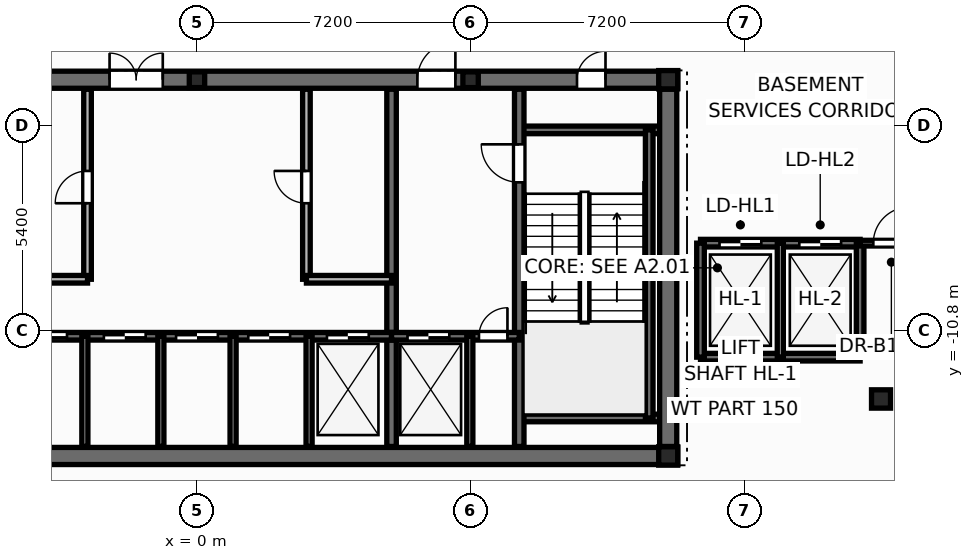
"""IFC4 building model, lengths in metres.
Left out: names, types, materials, properties, quantities, classifications, styles, units other than length and angle.
Written with IfcOpenShell. Run it as: python <this file> out.ifc"""

import sys

from ifc_helpers import new_model, si_unit, direction, frame, frame_2d, origin, origin_2d, place, context, subcontext, project, spatial, rectangle, i_section, extrude, element, fill, save


model = new_model("IFC4")
c1 = context("Model", 3, precision=1e-05, world=origin(), true_north=direction((0.0, 1.0)))
c2 = subcontext(c1, "Body", "Model", "MODEL_VIEW")
j1 = project(units=[si_unit("LENGTHUNIT", "METRE"), si_unit("PLANEANGLEUNIT", "RADIAN")], contexts=[c1])
p1 = place(None, origin())
s1 = spatial("IfcSite", under=j1, at=p1, CompositionType="ELEMENT")
p2 = place(p1, origin())
s2 = spatial("IfcBuilding", under=s1, at=p2, CompositionType="ELEMENT")
p3 = place(p2, frame((0.0, 0.0, -4.8)))
s3 = spatial("IfcBuildingStorey", under=s2, at=p3, CompositionType="ELEMENT", Elevation=-4.8)
for number, where, z_axis, x_axis in (
    (1, (12.4, -14.1, 0.0), (0.0, 0.0, 1.0), (1.0, 0.0, 0.0)),
    (2, (12.4, -4.2, 0.0), (0.0, 0.0, 1.0), (1.0, 0.0, 0.0)),
):
    element("IfcColumn", number, at=place(p3, frame(where, z_axis=z_axis, x_axis=x_axis)), inside=s3, PredefinedType="COLUMN", context=c2, shape_type="SweptSolid", body=[
        extrude(i_section(OverallWidth=0.5, OverallDepth=0.482, WebThickness=0.04, FlangeThickness=0.045, at=origin_2d()), origin(), (0.0, 0.0, 1.0), 4.8),
    ])
for number, where, z_axis, x_axis in (
    (3, (0.0, -4.2, 0.0), (0.0, 0.0, 1.0), (1.0, 0.0, 0.0)),
    (4, (7.2, -4.2, 0.0), (0.0, 0.0, 1.0), (1.0, 0.0, 0.0)),
):
    element("IfcColumn", number, at=place(p3, frame(where, z_axis=z_axis, x_axis=x_axis)), inside=s3, PredefinedType="PILASTER", context=c2, shape_type="SweptSolid", body=[
        extrude(i_section(OverallWidth=0.405, OverallDepth=0.414, WebThickness=0.022, FlangeThickness=0.032, at=origin_2d()), origin(), (0.0, 0.0, 1.0), 4.8),
    ])
p4 = place(p3, frame((18.0, -12.6, 0.0), z_axis=(0.0, 0.0, 1.0), x_axis=(1.0, 0.0, 0.0)))
e5 = element("IfcColumn", 5, at=p4, inside=s3, PredefinedType="COLUMN", context=c2, shape_type="SweptSolid", body=[
    extrude(i_section(OverallWidth=0.5, OverallDepth=0.482, WebThickness=0.04, FlangeThickness=0.045, at=origin_2d()), origin(), (0.0, 0.0, 1.0), 4.8),
])
p5 = place(p3, frame((-12.65, -14.1, 0.0), z_axis=(0.0, 0.0, 1.0), x_axis=(1.0, 0.0, 0.0)))
e6 = element("IfcWall", 6, at=p5, inside=s3, PredefinedType="SHEAR", context=c2, shape_type="SweptSolid", body=[
    extrude(rectangle(XDim=25.3, YDim=0.45, at=frame_2d((12.65, 0.0))), origin(), (0.0, 0.0, 1.0), 4.8),
])
p6 = place(p3, frame((-12.65, -4.2, 0.0), z_axis=(0.0, 0.0, 1.0), x_axis=(1.0, 0.0, 0.0)))
e7 = element("IfcWall", 7, at=p6, inside=s3, PredefinedType="SHEAR", context=c2, shape_type="SweptSolid", body=[
    extrude(rectangle(XDim=25.3, YDim=0.45, at=frame_2d((12.65, 0.0))), origin(), (0.0, 0.0, 1.0), 4.8),
])
p7 = place(p6, frame((1.85, 0.0, 0.0)))
e8 = element("IfcOpeningElement", 8, at=p7, cuts=e7, PredefinedType="OPENING", context=c2, shape_type="SweptSolid", body=[
    extrude(rectangle(XDim=0.756, YDim=2.054, at=frame_2d((0.375, 1.027))), frame((0.0, 0.235, 0.0), z_axis=(0.0, -1.0, 0.0), x_axis=(1.0, 0.0, 0.0)), (0.0, 0.0, 1.0), 0.47),
])
p8 = place(p6, frame((22.65, 0.0, 0.0)))
e9 = element("IfcOpeningElement", 9, at=p8, cuts=e7, PredefinedType="OPENING", context=c2, shape_type="SweptSolid", body=[
    extrude(rectangle(XDim=0.756, YDim=2.054, at=frame_2d((0.375, 1.027))), frame((0.0, 0.235, 0.0), z_axis=(0.0, -1.0, 0.0), x_axis=(1.0, 0.0, 0.0)), (0.0, 0.0, 1.0), 0.47),
])
p9 = place(p6, frame((5.85, 0.0, 0.0)))
e10 = element("IfcOpeningElement", 10, at=p9, cuts=e7, PredefinedType="OPENING", context=c2, shape_type="SweptSolid", body=[
    extrude(rectangle(XDim=1.006, YDim=2.104, at=frame_2d((0.5, 1.052))), frame((0.0, 0.235, 0.0), z_axis=(0.0, -1.0, 0.0), x_axis=(1.0, 0.0, 0.0)), (0.0, 0.0, 1.0), 0.47),
])
p10 = place(p6, frame((10.35, 0.0, 0.0)))
e11 = element("IfcOpeningElement", 11, at=p10, cuts=e7, PredefinedType="OPENING", context=c2, shape_type="SweptSolid", body=[
    extrude(rectangle(XDim=1.406, YDim=2.154, at=frame_2d((0.7, 1.077))), frame((0.0, 0.235, 0.0), z_axis=(0.0, -1.0, 0.0), x_axis=(1.0, 0.0, 0.0)), (0.0, 0.0, 1.0), 0.47),
])
p11 = place(p6, frame((18.45, 0.0, 0.0)))
e12 = element("IfcOpeningElement", 12, at=p11, cuts=e7, PredefinedType="OPENING", context=c2, shape_type="SweptSolid", body=[
    extrude(rectangle(XDim=1.006, YDim=2.104, at=frame_2d((0.5, 1.052))), frame((0.0, 0.235, 0.0), z_axis=(0.0, -1.0, 0.0), x_axis=(1.0, 0.0, 0.0)), (0.0, 0.0, 1.0), 0.47),
])
for number, where, z_axis, x_axis in (
    (13, (8.48, -5.52, 0.0), (0.0, 0.0, 1.0), (1.0, 0.0, 0.0)),
    (14, (8.48, -13.1, 0.0), (0.0, 0.0, 1.0), (1.0, 0.0, 0.0)),
):
    element("IfcWall", number, at=place(p3, frame(where, z_axis=z_axis, x_axis=x_axis)), inside=s3, PredefinedType="SOLIDWALL", context=c2, shape_type="SweptSolid", body=[
        extrude(rectangle(XDim=3.87, YDim=0.2, at=frame_2d((1.935, 0.0))), origin(), (0.0, 0.0, 1.0), 4.8),
    ])
p12 = place(p3, frame((11.9, -13.1, 0.0), z_axis=(0.0, 0.0, 1.0), x_axis=(0.0, 1.0, 0.0)))
e15 = element("IfcWall", 15, at=p12, inside=s3, PredefinedType="SOLIDWALL", context=c2, shape_type="SweptSolid", body=[
    extrude(rectangle(XDim=7.58, YDim=0.2, at=frame_2d((3.79, 0.0))), origin(), (0.0, 0.0, 1.0), 4.8),
])
p13 = place(p3, frame((8.48, -13.85, 0.0), z_axis=(0.0, 0.0, 1.0), x_axis=(0.0, 1.0, 0.0)))
e16 = element("IfcWall", 16, at=p13, inside=s3, PredefinedType="SHEAR", context=c2, shape_type="SweptSolid", body=[
    extrude(rectangle(XDim=9.4, YDim=0.25, at=frame_2d((4.7, 0.0))), origin(), (0.0, 0.0, 1.0), 4.8),
])
p14 = place(p13, frame((6.95, 0.0, 0.0)))
e17 = element("IfcOpeningElement", 17, at=p14, cuts=e16, PredefinedType="OPENING", context=c2, shape_type="SweptSolid", body=[
    extrude(rectangle(XDim=1.006, YDim=2.104, at=frame_2d((0.5, 1.052))), frame((0.0, 0.135, 0.0), z_axis=(0.0, -1.0, 0.0), x_axis=(1.0, 0.0, 0.0)), (0.0, 0.0, 1.0), 0.27),
])
p15 = place(p3, frame((5.12, -13.85, 0.0), z_axis=(0.0, 0.0, 1.0), x_axis=(0.0, 1.0, 0.0)))
e18 = element("IfcWall", 18, at=p15, inside=s3, PredefinedType="SHEAR", context=c2, shape_type="SweptSolid", body=[
    extrude(rectangle(XDim=9.4, YDim=0.25, at=frame_2d((4.7, 0.0))), origin(), (0.0, 0.0, 1.0), 4.8),
])
p16 = place(p3, frame((-5.12, -10.95, 0.0), z_axis=(0.0, 0.0, 1.0), x_axis=(1.0, 0.0, 0.0)))
e19 = element("IfcWall", 19, at=p16, inside=s3, PredefinedType="SOLIDWALL", context=c2, shape_type="SweptSolid", body=[
    extrude(rectangle(XDim=10.24, YDim=0.2, at=frame_2d((5.12, 0.0))), origin(), (0.0, 0.0, 1.0), 4.8),
])
p17 = place(p16, frame((0.6, 0.0, 0.0)))
e20 = element("IfcOpeningElement", 20, at=p17, cuts=e19, PredefinedType="OPENING", context=c2, shape_type="SweptSolid", body=[
    extrude(rectangle(XDim=1.106, YDim=2.104, at=frame_2d((0.55, 1.052))), frame((0.0, 0.11, 0.0), z_axis=(0.0, -1.0, 0.0), x_axis=(1.0, 0.0, 0.0)), (0.0, 0.0, 1.0), 0.22),
])
p18 = place(p16, frame((2.67, 0.0, 0.0)))
e21 = element("IfcOpeningElement", 21, at=p18, cuts=e19, PredefinedType="OPENING", context=c2, shape_type="SweptSolid", body=[
    extrude(rectangle(XDim=1.106, YDim=2.104, at=frame_2d((0.55, 1.052))), frame((0.0, 0.11, 0.0), z_axis=(0.0, -1.0, 0.0), x_axis=(1.0, 0.0, 0.0)), (0.0, 0.0, 1.0), 0.22),
])
p19 = place(p16, frame((4.57, 0.0, 0.0)))
e22 = element("IfcOpeningElement", 22, at=p19, cuts=e19, PredefinedType="OPENING", context=c2, shape_type="SweptSolid", body=[
    extrude(rectangle(XDim=1.106, YDim=2.104, at=frame_2d((0.55, 1.052))), frame((0.0, 0.11, 0.0), z_axis=(0.0, -1.0, 0.0), x_axis=(1.0, 0.0, 0.0)), (0.0, 0.0, 1.0), 0.22),
])
p20 = place(p16, frame((6.47, 0.0, 0.0)))
e23 = element("IfcOpeningElement", 23, at=p20, cuts=e19, PredefinedType="OPENING", context=c2, shape_type="SweptSolid", body=[
    extrude(rectangle(XDim=1.106, YDim=2.104, at=frame_2d((0.55, 1.052))), frame((0.0, 0.11, 0.0), z_axis=(0.0, -1.0, 0.0), x_axis=(1.0, 0.0, 0.0)), (0.0, 0.0, 1.0), 0.22),
])
p21 = place(p16, frame((8.54, 0.0, 0.0)))
e24 = element("IfcOpeningElement", 24, at=p21, cuts=e19, PredefinedType="OPENING", context=c2, shape_type="SweptSolid", body=[
    extrude(rectangle(XDim=1.106, YDim=2.104, at=frame_2d((0.55, 1.052))), frame((0.0, 0.11, 0.0), z_axis=(0.0, -1.0, 0.0), x_axis=(1.0, 0.0, 0.0)), (0.0, 0.0, 1.0), 0.22),
])
p22 = place(p3, frame((5.12, -10.95, 0.0), z_axis=(0.0, 0.0, 1.0), x_axis=(1.0, 0.0, 0.0)))
e25 = element("IfcWall", 25, at=p22, inside=s3, PredefinedType="SOLIDWALL", context=c2, shape_type="SweptSolid", body=[
    extrude(rectangle(XDim=3.36, YDim=0.2, at=frame_2d((1.68, 0.0))), origin(), (0.0, 0.0, 1.0), 4.8),
])
p23 = place(p22, frame((0.42, 0.0, 0.0)))
e26 = element("IfcOpeningElement", 26, at=p23, cuts=e25, PredefinedType="OPENING", context=c2, shape_type="SweptSolid", body=[
    extrude(rectangle(XDim=1.106, YDim=2.104, at=frame_2d((0.55, 1.052))), frame((0.0, 0.11, 0.0), z_axis=(0.0, -1.0, 0.0), x_axis=(1.0, 0.0, 0.0)), (0.0, 0.0, 1.0), 0.22),
])
p24 = place(p22, frame((2.3, 0.0, 0.0)))
e27 = element("IfcOpeningElement", 27, at=p24, cuts=e25, PredefinedType="OPENING", context=c2, shape_type="SweptSolid", body=[
    extrude(rectangle(XDim=0.756, YDim=2.054, at=frame_2d((0.375, 1.027))), frame((0.0, 0.11, 0.0), z_axis=(0.0, -1.0, 0.0), x_axis=(1.0, 0.0, 0.0)), (0.0, 0.0, 1.0), 0.22),
])
for number, where, z_axis, x_axis in (
    (28, (7.18, -13.85, 0.0), (0.0, 0.0, 1.0), (0.0, 1.0, 0.0)),
    (29, (-2.95, -13.85, 0.0), (0.0, 0.0, 1.0), (0.0, 1.0, 0.0)),
    (30, (2.95, -13.85, 0.0), (0.0, 0.0, 1.0), (0.0, 1.0, 0.0)),
):
    element("IfcWall", number, at=place(p3, frame(where, z_axis=z_axis, x_axis=x_axis)), inside=s3, PredefinedType="PARTITIONING", context=c2, shape_type="SweptSolid", body=[
        extrude(rectangle(XDim=2.9, YDim=0.16, at=frame_2d((1.45, 0.0))), origin(), (0.0, 0.0, 1.0), 3.505),
    ])
p25 = place(p3, frame((12.4, -13.85, 0.0), z_axis=(0.0, 0.0, 1.0), x_axis=(0.0, 1.0, 0.0)))
e31 = element("IfcWall", 31, at=p25, inside=s3, PredefinedType="SHEAR", context=c2, shape_type="SweptSolid", body=[
    extrude(rectangle(XDim=9.4, YDim=0.45, at=frame_2d((4.7, 0.0))), origin(), (0.0, 0.0, 1.0), 4.8),
])
p26 = place(p3, frame((-2.88, -9.45, 0.0), z_axis=(0.0, 0.0, 1.0), x_axis=(0.0, 1.0, 0.0)))
e32 = element("IfcWall", 32, at=p26, inside=s3, PredefinedType="SOLIDWALL", context=c2, shape_type="SweptSolid", body=[
    extrude(rectangle(XDim=5.0, YDim=0.2, at=frame_2d((2.5, 0.0))), origin(), (0.0, 0.0, 1.0), 4.48),
])
p27 = place(p26, frame((2.0, 0.0, 0.0)))
e33 = element("IfcOpeningElement", 33, at=p27, cuts=e32, PredefinedType="OPENING", context=c2, shape_type="SweptSolid", body=[
    extrude(rectangle(XDim=0.856, YDim=2.054, at=frame_2d((0.425, 1.027))), frame((0.0, 0.11, 0.0), z_axis=(0.0, -1.0, 0.0), x_axis=(1.0, 0.0, 0.0)), (0.0, 0.0, 1.0), 0.22),
])
p28 = place(p3, frame((-5.12, -9.45, 0.0), z_axis=(0.0, 0.0, 1.0), x_axis=(1.0, 0.0, 0.0)))
e34 = element("IfcWall", 34, at=p28, inside=s3, PredefinedType="SOLIDWALL", context=c2, shape_type="SweptSolid", body=[
    extrude(rectangle(XDim=2.24, YDim=0.2, at=frame_2d((1.12, 0.0))), origin(), (0.0, 0.0, 1.0), 4.48),
])
p29 = place(p3, frame((2.88, -9.45, 0.0), z_axis=(0.0, 0.0, 1.0), x_axis=(0.0, 1.0, 0.0)))
e35 = element("IfcWall", 35, at=p29, inside=s3, PredefinedType="SOLIDWALL", context=c2, shape_type="SweptSolid", body=[
    extrude(rectangle(XDim=5.0, YDim=0.2, at=frame_2d((2.5, 0.0))), origin(), (0.0, 0.0, 1.0), 4.48),
])
p30 = place(p29, frame((2.0, 0.0, 0.0)))
e36 = element("IfcOpeningElement", 36, at=p30, cuts=e35, PredefinedType="OPENING", context=c2, shape_type="SweptSolid", body=[
    extrude(rectangle(XDim=0.856, YDim=2.054, at=frame_2d((0.425, 1.027))), frame((0.0, 0.11, 0.0), z_axis=(0.0, -1.0, 0.0), x_axis=(1.0, 0.0, 0.0)), (0.0, 0.0, 1.0), 0.22),
])
p31 = place(p3, frame((2.88, -9.45, 0.0), z_axis=(0.0, 0.0, 1.0), x_axis=(1.0, 0.0, 0.0)))
e37 = element("IfcWall", 37, at=p31, inside=s3, PredefinedType="SOLIDWALL", context=c2, shape_type="SweptSolid", body=[
    extrude(rectangle(XDim=2.24, YDim=0.2, at=frame_2d((1.12, 0.0))), origin(), (0.0, 0.0, 1.0), 4.48),
])
for number, where, z_axis, x_axis in (
    (38, (-0.95, -13.85, 0.0), (0.0, 0.0, 1.0), (0.0, 1.0, 0.0)),
    (39, (0.95, -13.85, 0.0), (0.0, 0.0, 1.0), (0.0, 1.0, 0.0)),
):
    element("IfcWall", number, at=place(p3, frame(where, z_axis=z_axis, x_axis=x_axis)), inside=s3, PredefinedType="PARTITIONING", context=c2, shape_type="SweptSolid", body=[
        extrude(rectangle(XDim=2.9, YDim=0.16, at=frame_2d((1.45, 0.0))), origin(), (0.0, 0.0, 1.0), 3.505),
    ])
p32 = place(p3, frame((13.25, -11.5, 0.0), z_axis=(0.0, 0.0, 1.0), x_axis=(1.0, 0.0, 0.0)))
e40 = element("IfcWall", 40, at=p32, inside=s3, PredefinedType="SOLIDWALL", context=c2, shape_type="SweptSolid", body=[
    extrude(rectangle(XDim=4.2, YDim=0.2, at=frame_2d((2.1, 0.0))), origin(), (0.0, 0.0, 1.0), 4.8),
])
p33 = place(p3, frame((13.25, -8.5, 0.0), z_axis=(0.0, 0.0, 1.0), x_axis=(1.0, 0.0, 0.0)))
e41 = element("IfcWall", 41, at=p33, inside=s3, PredefinedType="SOLIDWALL", context=c2, shape_type="SweptSolid", body=[
    extrude(rectangle(XDim=4.2, YDim=0.2, at=frame_2d((2.1, 0.0))), origin(), (0.0, 0.0, 1.0), 4.8),
])
p34 = place(p33, frame((0.5, 0.0, 0.0)))
e42 = element("IfcOpeningElement", 42, at=p34, cuts=e41, PredefinedType="OPENING", context=c2, shape_type="SweptSolid", body=[
    extrude(rectangle(XDim=1.106, YDim=2.104, at=frame_2d((0.55, 1.052))), frame((0.0, 0.11, 0.0), z_axis=(0.0, -1.0, 0.0), x_axis=(1.0, 0.0, 0.0)), (0.0, 0.0, 1.0), 0.22),
])
p35 = place(p33, frame((2.6, 0.0, 0.0)))
e43 = element("IfcOpeningElement", 43, at=p35, cuts=e41, PredefinedType="OPENING", context=c2, shape_type="SweptSolid", body=[
    extrude(rectangle(XDim=1.106, YDim=2.104, at=frame_2d((0.55, 1.052))), frame((0.0, 0.11, 0.0), z_axis=(0.0, -1.0, 0.0), x_axis=(1.0, 0.0, 0.0)), (0.0, 0.0, 1.0), 0.22),
])
for number, where, z_axis, x_axis in (
    (44, (13.25, -11.5, 0.0), (0.0, 0.0, 1.0), (0.0, 1.0, 0.0)),
    (45, (17.45, -11.5, 0.0), (0.0, 0.0, 1.0), (0.0, 1.0, 0.0)),
):
    element("IfcWall", number, at=place(p3, frame(where, z_axis=z_axis, x_axis=x_axis)), inside=s3, PredefinedType="SOLIDWALL", context=c2, shape_type="SweptSolid", body=[
        extrude(rectangle(XDim=3.0, YDim=0.2, at=frame_2d((1.5, 0.0))), origin(), (0.0, 0.0, 1.0), 4.8),
    ])
p36 = place(p3, frame((15.35, -11.5, 0.0), z_axis=(0.0, 0.0, 1.0), x_axis=(0.0, 1.0, 0.0)))
e46 = element("IfcWall", 46, at=p36, inside=s3, PredefinedType="PARTITIONING", context=c2, shape_type="SweptSolid", body=[
    extrude(rectangle(XDim=3.0, YDim=0.16, at=frame_2d((1.5, 0.0))), origin(), (0.0, 0.0, 1.0), 4.48),
])
p37 = place(p3, frame((17.452, -8.5, 0.0), z_axis=(0.0, 0.0, 1.0), x_axis=(1.0, 0.0, 0.0)))
e47 = element("IfcWall", 47, at=p37, inside=s3, PredefinedType="PARTITIONING", context=c2, shape_type="SweptSolid", body=[
    extrude(rectangle(XDim=1.986, YDim=0.15, at=frame_2d((0.993, 0.0))), origin(), (0.0, 0.0, 1.0), 4.48),
])
p38 = place(p37, frame((0.345, 0.0, 0.0)))
e48 = element("IfcOpeningElement", 48, at=p38, cuts=e47, PredefinedType="OPENING", context=c2, shape_type="SweptSolid", body=[
    extrude(rectangle(XDim=0.956, YDim=2.104, at=frame_2d((0.475, 1.052))), frame((0.0, 0.085, 0.0), z_axis=(0.0, -1.0, 0.0), x_axis=(1.0, 0.0, 0.0)), (0.0, 0.0, 1.0), 0.17),
])
p39 = place(p27, origin())
e49 = element("IfcDoor", 49, at=p39, inside=s3, OperationType="SINGLE_SWING_LEFT", PredefinedType="DOOR", context=c2, shape_type="SweptSolid", body=[
    extrude(rectangle(XDim=0.85, YDim=2.05, at=frame_2d((0.425, 1.025))), frame((0.0, 0.025, 0.0), z_axis=(0.0, -1.0, 0.0), x_axis=(1.0, 0.0, 0.0)), (0.0, 0.0, 1.0), 0.05),
])
fill(e33, e49)
p40 = place(p30, origin())
e50 = element("IfcDoor", 50, at=p40, inside=s3, OperationType="SINGLE_SWING_RIGHT", PredefinedType="DOOR", context=c2, shape_type="SweptSolid", body=[
    extrude(rectangle(XDim=0.85, YDim=2.05, at=frame_2d((0.425, 1.025))), frame((0.0, 0.025, 0.0), z_axis=(0.0, -1.0, 0.0), x_axis=(1.0, 0.0, 0.0)), (0.0, 0.0, 1.0), 0.05),
])
fill(e36, e50)
p41 = place(p14, origin())
e51 = element("IfcDoor", 51, at=p41, inside=s3, OperationType="SINGLE_SWING_RIGHT", PredefinedType="DOOR", context=c2, shape_type="SweptSolid", body=[
    extrude(rectangle(XDim=1.0, YDim=2.1, at=frame_2d((0.5, 1.05))), frame((0.0, 0.025, 0.0), z_axis=(0.0, -1.0, 0.0), x_axis=(1.0, 0.0, 0.0)), (0.0, 0.0, 1.0), 0.05),
])
fill(e17, e51)
p42 = place(p23, origin())
e52 = element("IfcDoor", 52, at=p42, inside=s3, OperationType="DOUBLE_DOOR_SLIDING", PredefinedType="DOOR", context=c2, shape_type="SweptSolid", body=[
    extrude(rectangle(XDim=1.1, YDim=2.1, at=frame_2d((0.55, 1.05))), frame((0.0, 0.025, 0.0), z_axis=(0.0, -1.0, 0.0), x_axis=(1.0, 0.0, 0.0)), (0.0, 0.0, 1.0), 0.05),
])
fill(e26, e52)
p43 = place(p24, origin())
e53 = element("IfcDoor", 53, at=p43, inside=s3, OperationType="SINGLE_SWING_RIGHT", PredefinedType="DOOR", context=c2, shape_type="SweptSolid", body=[
    extrude(rectangle(XDim=0.75, YDim=2.05, at=frame_2d((0.375, 1.025))), frame((0.0, 0.025, 0.0), z_axis=(0.0, -1.0, 0.0), x_axis=(1.0, 0.0, 0.0)), (0.0, 0.0, 1.0), 0.05),
])
fill(e27, e53)
p44 = place(p17, origin())
e54 = element("IfcDoor", 54, at=p44, inside=s3, OperationType="DOUBLE_DOOR_SLIDING", PredefinedType="DOOR", context=c2, shape_type="SweptSolid", body=[
    extrude(rectangle(XDim=1.1, YDim=2.1, at=frame_2d((0.55, 1.05))), frame((0.0, 0.025, 0.0), z_axis=(0.0, -1.0, 0.0), x_axis=(1.0, 0.0, 0.0)), (0.0, 0.0, 1.0), 0.05),
])
fill(e20, e54)
p45 = place(p18, origin())
e55 = element("IfcDoor", 55, at=p45, inside=s3, OperationType="DOUBLE_DOOR_SLIDING", PredefinedType="DOOR", context=c2, shape_type="SweptSolid", body=[
    extrude(rectangle(XDim=1.1, YDim=2.1, at=frame_2d((0.55, 1.05))), frame((0.0, 0.025, 0.0), z_axis=(0.0, -1.0, 0.0), x_axis=(1.0, 0.0, 0.0)), (0.0, 0.0, 1.0), 0.05),
])
fill(e21, e55)
p46 = place(p19, origin())
e56 = element("IfcDoor", 56, at=p46, inside=s3, OperationType="DOUBLE_DOOR_SLIDING", PredefinedType="DOOR", context=c2, shape_type="SweptSolid", body=[
    extrude(rectangle(XDim=1.1, YDim=2.1, at=frame_2d((0.55, 1.05))), frame((0.0, 0.025, 0.0), z_axis=(0.0, -1.0, 0.0), x_axis=(1.0, 0.0, 0.0)), (0.0, 0.0, 1.0), 0.05),
])
fill(e22, e56)
p47 = place(p20, origin())
e57 = element("IfcDoor", 57, at=p47, inside=s3, OperationType="DOUBLE_DOOR_SLIDING", PredefinedType="DOOR", context=c2, shape_type="SweptSolid", body=[
    extrude(rectangle(XDim=1.1, YDim=2.1, at=frame_2d((0.55, 1.05))), frame((0.0, 0.025, 0.0), z_axis=(0.0, -1.0, 0.0), x_axis=(1.0, 0.0, 0.0)), (0.0, 0.0, 1.0), 0.05),
])
fill(e23, e57)
p48 = place(p21, origin())
e58 = element("IfcDoor", 58, at=p48, inside=s3, OperationType="DOUBLE_DOOR_SLIDING", PredefinedType="DOOR", context=c2, shape_type="SweptSolid", body=[
    extrude(rectangle(XDim=1.1, YDim=2.1, at=frame_2d((0.55, 1.05))), frame((0.0, 0.025, 0.0), z_axis=(0.0, -1.0, 0.0), x_axis=(1.0, 0.0, 0.0)), (0.0, 0.0, 1.0), 0.05),
])
fill(e24, e58)
p49 = place(p8, origin())
e59 = element("IfcDoor", 59, at=p49, inside=s3, OperationType="SINGLE_SWING_RIGHT", PredefinedType="DOOR", context=c2, shape_type="SweptSolid", body=[
    extrude(rectangle(XDim=0.75, YDim=2.05, at=frame_2d((0.375, 1.025))), frame((0.0, 0.025, 0.0), z_axis=(0.0, -1.0, 0.0), x_axis=(1.0, 0.0, 0.0)), (0.0, 0.0, 1.0), 0.05),
])
fill(e9, e59)
p50 = place(p10, origin())
e60 = element("IfcDoor", 60, at=p50, inside=s3, OperationType="DOUBLE_DOOR_SINGLE_SWING", PredefinedType="DOOR", context=c2, shape_type="SweptSolid", body=[
    extrude(rectangle(XDim=1.4, YDim=2.15, at=frame_2d((0.7, 1.075))), frame((0.0, 0.025, 0.0), z_axis=(0.0, -1.0, 0.0), x_axis=(1.0, 0.0, 0.0)), (0.0, 0.0, 1.0), 0.05),
])
fill(e11, e60)
p51 = place(p11, origin())
e61 = element("IfcDoor", 61, at=p51, inside=s3, OperationType="SINGLE_SWING_RIGHT", PredefinedType="DOOR", context=c2, shape_type="SweptSolid", body=[
    extrude(rectangle(XDim=1.0, YDim=2.1, at=frame_2d((0.5, 1.05))), frame((0.0, 0.025, 0.0), z_axis=(0.0, -1.0, 0.0), x_axis=(1.0, 0.0, 0.0)), (0.0, 0.0, 1.0), 0.05),
])
fill(e12, e61)
p52 = place(p34, origin())
e62 = element("IfcDoor", 62, at=p52, inside=s3, OperationType="DOUBLE_DOOR_SLIDING", PredefinedType="DOOR", context=c2, shape_type="SweptSolid", body=[
    extrude(rectangle(XDim=1.1, YDim=2.1, at=frame_2d((0.55, 1.05))), frame((0.0, 0.025, 0.0), z_axis=(0.0, -1.0, 0.0), x_axis=(1.0, 0.0, 0.0)), (0.0, 0.0, 1.0), 0.05),
])
fill(e42, e62)
p53 = place(p35, origin())
e63 = element("IfcDoor", 63, at=p53, inside=s3, OperationType="DOUBLE_DOOR_SLIDING", PredefinedType="DOOR", context=c2, shape_type="SweptSolid", body=[
    extrude(rectangle(XDim=1.1, YDim=2.1, at=frame_2d((0.55, 1.05))), frame((0.0, 0.025, 0.0), z_axis=(0.0, -1.0, 0.0), x_axis=(1.0, 0.0, 0.0)), (0.0, 0.0, 1.0), 0.05),
])
fill(e43, e63)
p54 = place(p38, origin())
e64 = element("IfcDoor", 64, at=p54, inside=s3, OperationType="SINGLE_SWING_RIGHT", PredefinedType="DOOR", context=c2, shape_type="SweptSolid", body=[
    extrude(rectangle(XDim=0.95, YDim=2.1, at=frame_2d((0.475, 1.05))), frame((0.0, 0.025, 0.0), z_axis=(0.0, -1.0, 0.0), x_axis=(1.0, 0.0, 0.0)), (0.0, 0.0, 1.0), 0.05),
])
fill(e48, e64)
save(model, sys.argv[1])
